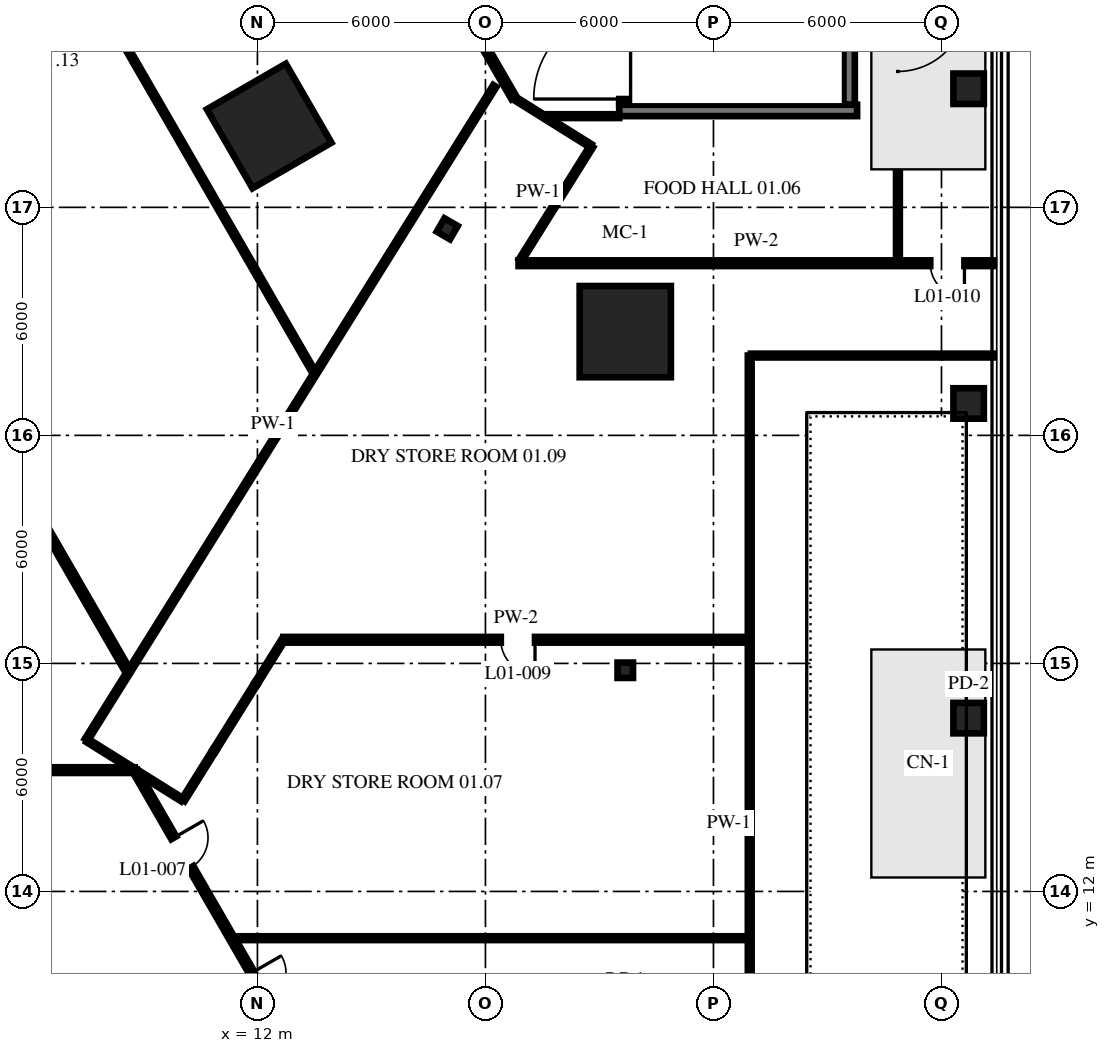
"""IFC4 building model, lengths in metres.
Left out: names, types, materials, properties, quantities, classifications, styles, units other than length and angle.
Written with IfcOpenShell. Run it as: python <this file> out.ifc"""

import sys

from ifc_helpers import new_model, si_unit, direction, frame, frame_2d, origin, origin_2d, place, context, subcontext, project, spatial, polyline, rectangle, i_section, outline, extrude, source, transform, mapped, element, fill, save


model = new_model("IFC4")
c1 = context("Model", 3, precision=1e-05, world=origin(), true_north=direction((0.0, 1.0)))
c2 = subcontext(c1, "Body", "Model", "MODEL_VIEW")
j1 = project(units=[si_unit("LENGTHUNIT", "METRE"), si_unit("PLANEANGLEUNIT", "RADIAN")], contexts=[c1])
p1 = place(None, origin())
s1 = spatial("IfcSite", under=j1, at=p1, CompositionType="ELEMENT")
p2 = place(p1, origin())
s2 = spatial("IfcBuilding", under=s1, at=p2, CompositionType="ELEMENT")
p3 = place(p2, frame((0.0, 0.0, 7.0)))
s3 = spatial("IfcBuildingStorey", under=s2, at=p3, CompositionType="ELEMENT", Elevation=7.0)
m1 = source(origin(), c2, "Body", "SweptSolid", [
    extrude(i_section(OverallWidth=0.404, OverallDepth=0.406, WebThickness=0.027, FlangeThickness=0.044, at=origin_2d()), origin(), (0.0, 0.0, 1.0), 4.5),
])
p4 = place(p3, frame((21.679, 17.82, 0.0), z_axis=(0.0, 0.0, 1.0), x_axis=(0.0, 1.0, 0.0)))
e1 = element("IfcColumn", 1, at=p4, inside=s3, PredefinedType="COLUMN", context=c2, shape_type="MappedRepresentation", body=[
    mapped(m1, transform((0.0, 0.0, 0.0), scale=1.0)),
])
m2 = source(origin(), c2, "Body", "SweptSolid", [
    extrude(rectangle(XDim=2.4, YDim=2.4, at=origin_2d()), origin(), (0.0, 0.0, 1.0), 4.5),
])
p5 = place(p3, frame((21.679, 26.73, 0.0), z_axis=(0.0, 0.0, 1.0), x_axis=(0.0, 1.0, 0.0)))
e2 = element("IfcColumn", 2, at=p5, inside=s3, PredefinedType="COLUMN", context=c2, shape_type="MappedRepresentation", body=[
    mapped(m2, transform((0.0, 0.0, 0.0), scale=1.0)),
])
p6 = place(p3, frame((16.994, 29.435, 0.0), z_axis=(0.0, 0.0, 1.0), x_axis=(-0.866026276448, 0.4999984885, 0.0)))
e3 = element("IfcColumn", 3, at=p6, inside=s3, PredefinedType="COLUMN", context=c2, shape_type="MappedRepresentation", body=[
    mapped(m1, transform((0.0, 0.0, 0.0), scale=1.0)),
])
p7 = place(p3, frame((12.309, 32.14, 0.0), z_axis=(0.0, 0.0, 1.0), x_axis=(-0.866025403784, -0.5, 0.0)))
e4 = element("IfcColumn", 4, at=p7, inside=s3, PredefinedType="COLUMN", context=c2, shape_type="MappedRepresentation", body=[
    mapped(m2, transform((0.0, 0.0, 0.0), scale=1.0)),
])
m3 = source(origin(), c2, "Body", "SweptSolid", [
    extrude(rectangle(XDim=0.8, YDim=0.8, at=origin_2d()), origin(), (0.0, 0.0, 1.0), 4.5),
])
for number, where, z_axis, x_axis in (
    (5, (30.715, 16.56, 0.0), (0.0, 0.0, 1.0), (0.0, 1.0, 0.0)),
    (6, (30.715, 24.84, 0.0), (0.0, 0.0, 1.0), (0.0, 1.0, 0.0)),
    (7, (30.715, 33.12, 0.0), (0.0, 0.0, 1.0), (0.0, 1.0, 0.0)),
):
    element("IfcColumn", number, at=place(p3, frame(where, z_axis=z_axis, x_axis=x_axis)), inside=s3, PredefinedType="COLUMN", context=c2, shape_type="MappedRepresentation", body=[
        mapped(m3, transform((0.0, 0.0, 0.0), scale=1.0)),
    ])
m4 = source(origin(), c2, "Body", "SweptSolid", [
    extrude(outline(polyline([(-0.115, -0.2), (11.885, -0.2), (11.654, 0.2), (0.115, 0.2), (-0.115, -0.2)])), origin(), (0.0, 0.0, 1.0), 4.3),
])
p8 = place(p3, frame((11.769, 0.0, 0.0), z_axis=(0.0, 0.0, 1.0), x_axis=(-0.499996592174, 0.866027371285, 0.0)))
e8 = element("IfcWall", 8, at=p8, inside=s3, PredefinedType="SHEAR", context=c2, shape_type="MappedRepresentation", body=[
    mapped(m4, transform((0.0, 0.0, 0.0), scale=1.0)),
])
p9 = place(p8, frame((5.75, 0.0, 0.0)))
e9 = element("IfcOpeningElement", 9, at=p9, cuts=e8, PredefinedType="OPENING", context=c2, shape_type="SweptSolid", body=[
    extrude(rectangle(XDim=1.2, YDim=2.1, at=frame_2d((0.6, 1.05))), frame((0.0, 0.21, 0.0), z_axis=(0.0, -1.0, 0.0), x_axis=(1.0, 0.0, 0.0)), (0.0, 0.0, 1.0), 0.42),
])
m5 = source(origin(), c2, "Body", "SweptSolid", [
    extrude(rectangle(XDim=10.3, YDim=0.3, at=frame_2d((5.15, 0.0))), origin(), (0.0, 0.0, 1.0), 4.3),
])
p10 = place(p3, frame((21.67, 32.7, 0.0), z_axis=(0.0, 0.0, 1.0), x_axis=(0.0, 1.0, 0.0)))
e10 = element("IfcWall", 10, at=p10, inside=s3, PredefinedType="SHEAR", context=c2, shape_type="MappedRepresentation", body=[
    mapped(m5, transform((0.0, 0.0, 0.0), scale=1.0)),
])
p11 = place(p10, frame((0.15, 0.0, 0.0)))
e11 = element("IfcOpeningElement", 11, at=p11, cuts=e10, PredefinedType="OPENING", context=c2, shape_type="SweptSolid", body=[
    extrude(rectangle(XDim=2.4, YDim=2.1, at=frame_2d((1.2, 1.05))), frame((0.0, 0.16, 0.0), z_axis=(0.0, -1.0, 0.0), x_axis=(1.0, 0.0, 0.0)), (0.0, 0.0, 1.0), 0.32),
])
p12 = place(p3, frame((27.57, 32.7, 0.0), z_axis=(0.0, 0.0, 1.0), x_axis=(0.0, 1.0, 0.0)))
e12 = element("IfcWall", 12, at=p12, inside=s3, PredefinedType="SHEAR", context=c2, shape_type="MappedRepresentation", body=[
    mapped(m5, transform((0.0, 0.0, 0.0), scale=1.0)),
])
m6 = source(origin(), c2, "Body", "SweptSolid", [
    extrude(rectangle(XDim=6.26, YDim=0.3, at=frame_2d((3.13, 0.0))), origin(), (0.0, 0.0, 1.0), 4.3),
])
p13 = place(p3, frame((21.52, 32.55, 0.0), z_axis=(0.0, 0.0, 1.0), x_axis=(1.0, 0.0, 0.0)))
e13 = element("IfcWall", 13, at=p13, inside=s3, PredefinedType="SHEAR", context=c2, shape_type="MappedRepresentation", body=[
    mapped(m6, transform((0.0, 0.0, 0.0), scale=1.0)),
])
p14 = place(p3, frame((8.792, 15.156, 0.0), z_axis=(0.0, 0.0, 1.0), x_axis=(0.499996830835, -0.866027233495, 0.0)))
e14 = element("IfcWall", 14, at=p14, inside=s3, PredefinedType="PARTITIONING", context=c2, shape_type="SweptSolid", body=[
    extrude(rectangle(XDim=17.458, YDim=0.15, at=frame_2d((8.729, 0.0))), origin(), (0.0, 0.0, 1.0), 4.3),
])
p15 = place(p14, frame((11.551, 0.0, 0.0)))
e15 = element("IfcOpeningElement", 15, at=p15, cuts=e14, PredefinedType="OPENING", context=c2, shape_type="SweptSolid", body=[
    extrude(rectangle(XDim=2.4, YDim=2.4, at=frame_2d((1.2, 1.2))), frame((0.0, 0.085, 0.0), z_axis=(0.0, -1.0, 0.0), x_axis=(1.0, 0.0, 0.0)), (0.0, 0.0, 1.0), 0.17),
])
p16 = place(p14, frame((2.014, 0.0, 0.0)))
e16 = element("IfcOpeningElement", 16, at=p16, cuts=e14, PredefinedType="OPENING", context=c2, shape_type="SweptSolid", body=[
    extrude(rectangle(XDim=0.9, YDim=2.1, at=frame_2d((0.45, 1.05))), frame((0.0, 0.085, 0.0), z_axis=(0.0, -1.0, 0.0), x_axis=(1.0, 0.0, 0.0)), (0.0, 0.0, 1.0), 0.17),
])
p17 = place(p14, frame((6.117, 0.0, 0.0)))
e17 = element("IfcOpeningElement", 17, at=p17, cuts=e14, PredefinedType="OPENING", context=c2, shape_type="SweptSolid", body=[
    extrude(rectangle(XDim=0.9, YDim=2.1, at=frame_2d((0.45, 1.05))), frame((0.0, 0.085, 0.0), z_axis=(0.0, -1.0, 0.0), x_axis=(1.0, 0.0, 0.0)), (0.0, 0.0, 1.0), 0.17),
])
p18 = place(p3, frame((-1.012, 34.432, 0.0), z_axis=(0.0, 0.0, 1.0), x_axis=(0.500001446062, -0.866024568899, 0.0)))
e18 = element("IfcWall", 18, at=p18, inside=s3, PredefinedType="PARTITIONING", context=c2, shape_type="SweptSolid", body=[
    extrude(rectangle(XDim=19.165, YDim=0.15, at=frame_2d((9.582, 0.0))), origin(), (0.0, 0.0, 1.0), 4.3),
])
p19 = place(p18, frame((9.094, 0.0, 0.0)))
e19 = element("IfcOpeningElement", 19, at=p19, cuts=e18, PredefinedType="OPENING", context=c2, shape_type="SweptSolid", body=[
    extrude(rectangle(XDim=0.9, YDim=2.1, at=frame_2d((0.45, 1.05))), frame((0.0, 0.085, 0.0), z_axis=(0.0, -1.0, 0.0), x_axis=(1.0, 0.0, 0.0)), (0.0, 0.0, 1.0), 0.17),
])
p20 = place(p3, frame((6.064, 38.517, 0.0), z_axis=(0.0, 0.0, 1.0), x_axis=(0.499994955836, -0.866028316015, 0.0)))
e20 = element("IfcWall", 20, at=p20, inside=s3, PredefinedType="PARTITIONING", context=c2, shape_type="SweptSolid", body=[
    extrude(rectangle(XDim=14.839, YDim=0.1, at=frame_2d((7.419, 0.0))), origin(), (0.0, 0.0, 1.0), 4.3),
])
p21 = place(p3, frame((12.612, 43.515, 0.0), z_axis=(0.0, 0.0, 1.0), x_axis=(0.50000466477, -0.866022710561, 0.0)))
e21 = element("IfcWall", 21, at=p21, inside=s3, PredefinedType="PARTITIONING", context=c2, shape_type="SweptSolid", body=[
    extrude(rectangle(XDim=12.281, YDim=0.15, at=frame_2d((6.141, 0.0))), origin(), (0.0, 0.0, 1.0), 4.3),
])
p22 = place(p21, frame((5.675, 0.0, 0.0)))
e22 = element("IfcOpeningElement", 22, at=p22, cuts=e21, PredefinedType="OPENING", context=c2, shape_type="SweptSolid", body=[
    extrude(rectangle(XDim=0.9, YDim=2.1, at=frame_2d((0.45, 1.05))), frame((0.0, 0.085, 0.0), z_axis=(0.0, -1.0, 0.0), x_axis=(1.0, 0.0, 0.0)), (0.0, 0.0, 1.0), 0.17),
])
p23 = place(p3, frame((7.524, 15.971, 0.0), z_axis=(0.0, 0.0, 1.0), x_axis=(0.848138224162, -0.529775001973, 0.0)))
e23 = element("IfcWall", 23, at=p23, inside=s3, PredefinedType="PARTITIONING", context=c2, shape_type="SweptSolid", body=[
    extrude(rectangle(XDim=2.94, YDim=0.1, at=frame_2d((1.47, 0.0))), origin(), (0.0, 0.0, 1.0), 4.3),
])
p24 = place(p3, frame((18.757, 32.877, 0.0), z_axis=(0.0, 0.0, 1.0), x_axis=(0.848102444988, -0.529832277996, 0.0)))
e24 = element("IfcWall", 24, at=p24, inside=s3, PredefinedType="PARTITIONING", context=c2, shape_type="SweptSolid", body=[
    extrude(rectangle(XDim=2.37, YDim=0.1, at=frame_2d((1.185, 0.0))), origin(), (0.0, 0.0, 1.0), 4.3),
])
p25 = place(p3, frame((11.415, 10.77, 0.0), z_axis=(0.0, 0.0, 1.0), x_axis=(1.0, 0.0, 0.0)))
e25 = element("IfcWall", 25, at=p25, inside=s3, PredefinedType="PARTITIONING", context=c2, shape_type="SweptSolid", body=[
    extrude(rectangle(XDim=13.51, YDim=0.1, at=frame_2d((6.755, 0.0))), origin(), (0.0, 0.0, 1.0), 4.3),
])
p26 = place(p3, frame((-8.771, 15.192, 0.0), z_axis=(0.0, 0.0, 1.0), x_axis=(1.0, 0.0, 0.0)))
e26 = element("IfcWall", 26, at=p26, inside=s3, PredefinedType="PARTITIONING", context=c2, shape_type="SweptSolid", body=[
    extrude(rectangle(XDim=17.541, YDim=0.15, at=frame_2d((8.771, 0.0))), origin(), (0.0, 0.0, 1.0), 4.3),
])
p27 = place(p26, frame((4.212, 0.0, 0.0)))
e27 = element("IfcOpeningElement", 27, at=p27, cuts=e26, PredefinedType="OPENING", context=c2, shape_type="SweptSolid", body=[
    extrude(rectangle(XDim=0.9, YDim=2.1, at=frame_2d((0.45, 1.05))), frame((0.0, 0.085, 0.0), z_axis=(0.0, -1.0, 0.0), x_axis=(1.0, 0.0, 0.0)), (0.0, 0.0, 1.0), 0.17),
])
p28 = place(p26, frame((12.993, 0.0, 0.0)))
e28 = element("IfcOpeningElement", 28, at=p28, cuts=e26, PredefinedType="OPENING", context=c2, shape_type="SweptSolid", body=[
    extrude(rectangle(XDim=0.9, YDim=2.1, at=frame_2d((0.45, 1.05))), frame((0.0, 0.085, 0.0), z_axis=(0.0, -1.0, 0.0), x_axis=(1.0, 0.0, 0.0)), (0.0, 0.0, 1.0), 0.17),
])
p29 = place(p3, frame((12.682, 18.622, 0.0), z_axis=(0.0, 0.0, 1.0), x_axis=(1.0, 0.0, 0.0)))
e29 = element("IfcWall", 29, at=p29, inside=s3, PredefinedType="PARTITIONING", context=c2, shape_type="SweptSolid", body=[
    extrude(rectangle(XDim=12.242, YDim=0.15, at=frame_2d((6.121, 0.0))), origin(), (0.0, 0.0, 1.0), 4.3),
])
p30 = place(p29, frame((5.722, 0.0, 0.0)))
e30 = element("IfcOpeningElement", 30, at=p30, cuts=e29, PredefinedType="OPENING", context=c2, shape_type="SweptSolid", body=[
    extrude(rectangle(XDim=0.9, YDim=2.1, at=frame_2d((0.45, 1.05))), frame((0.0, 0.085, 0.0), z_axis=(0.0, -1.0, 0.0), x_axis=(1.0, 0.0, 0.0)), (0.0, 0.0, 1.0), 0.17),
])
m7 = source(origin(), c2, "Body", "SweptSolid", [
    extrude(rectangle(XDim=6.395, YDim=0.1, at=frame_2d((3.198, 0.0))), origin(), (0.0, 0.0, 1.0), 4.3),
])
p31 = place(p3, frame((24.984, 26.1, 0.0), z_axis=(0.0, 0.0, 1.0), x_axis=(1.0, 0.0, 0.0)))
e31 = element("IfcWall", 31, at=p31, inside=s3, PredefinedType="PARTITIONING", context=c2, shape_type="MappedRepresentation", body=[
    mapped(m7, transform((0.0, 0.0, 0.0), scale=1.0)),
])
p32 = place(p3, frame((18.871, 28.53, 0.0), z_axis=(0.0, 0.0, 1.0), x_axis=(1.0, 0.0, 0.0)))
e32 = element("IfcWall", 32, at=p32, inside=s3, PredefinedType="PARTITIONING", context=c2, shape_type="SweptSolid", body=[
    extrude(rectangle(XDim=12.508, YDim=0.15, at=frame_2d((6.254, 0.0))), origin(), (0.0, 0.0, 1.0), 4.3),
])
p33 = place(p32, frame((10.833, 0.0, 0.0)))
e33 = element("IfcOpeningElement", 33, at=p33, cuts=e32, PredefinedType="OPENING", context=c2, shape_type="SweptSolid", body=[
    extrude(rectangle(XDim=0.9, YDim=2.1, at=frame_2d((0.45, 1.05))), frame((0.0, 0.085, 0.0), z_axis=(0.0, -1.0, 0.0), x_axis=(1.0, 0.0, 0.0)), (0.0, 0.0, 1.0), 0.17),
])
m8 = source(origin(), c2, "Body", "SweptSolid", [
    extrude(rectangle(XDim=1.87, YDim=0.1, at=frame_2d((0.935, 0.0))), origin(), (0.0, 0.0, 1.0), 4.3),
])
p34 = place(p3, frame((19.65, 32.4, 0.0), z_axis=(0.0, 0.0, 1.0), x_axis=(1.0, 0.0, 0.0)))
e34 = element("IfcWall", 34, at=p34, inside=s3, PredefinedType="PARTITIONING", context=c2, shape_type="MappedRepresentation", body=[
    mapped(m8, transform((0.0, 0.0, 0.0), scale=1.0)),
])
p35 = place(p3, frame((10.043, 14.398, 0.0), z_axis=(0.0, 0.0, 1.0), x_axis=(0.529829394742, 0.848104246226, 0.0)))
e35 = element("IfcWall", 35, at=p35, inside=s3, PredefinedType="PARTITIONING", context=c2, shape_type="SweptSolid", body=[
    extrude(rectangle(XDim=1.553, YDim=0.1, at=frame_2d((0.777, 0.0))), origin(), (0.0, 0.0, 1.0), 4.3),
])
p36 = place(p3, frame((10.866, 15.715, 0.0), z_axis=(0.0, 0.0, 1.0), x_axis=(0.529713918313, 0.848176375965, 0.0)))
e36 = element("IfcWall", 36, at=p36, inside=s3, PredefinedType="PARTITIONING", context=c2, shape_type="SweptSolid", body=[
    extrude(rectangle(XDim=2.079, YDim=0.1, at=frame_2d((1.04, 0.0))), origin(), (0.0, 0.0, 1.0), 3.358),
])
p37 = place(p3, frame((11.968, 17.479, 0.0), z_axis=(0.0, 0.0, 1.0), x_axis=(0.529780863385, 0.848134562903, 0.0)))
e37 = element("IfcWall", 37, at=p37, inside=s3, PredefinedType="PARTITIONING", context=c2, shape_type="SweptSolid", body=[
    extrude(rectangle(XDim=1.308, YDim=0.1, at=frame_2d((0.654, 0.0))), origin(), (0.0, 0.0, 1.0), 4.3),
])
p38 = place(p3, frame((18.924, 28.615, 0.0), z_axis=(0.0, 0.0, 1.0), x_axis=(0.52976863329, 0.848142202217, 0.0)))
e38 = element("IfcWall", 38, at=p38, inside=s3, PredefinedType="PARTITIONING", context=c2, shape_type="SweptSolid", body=[
    extrude(rectangle(XDim=3.526, YDim=0.1, at=frame_2d((1.763, 0.0))), origin(), (0.0, 0.0, 1.0), 4.3),
])
p39 = place(p3, frame((7.499, 15.987, 0.0), z_axis=(0.0, 0.0, 1.0), x_axis=(0.529789085059, 0.848129427241, 0.0)))
e39 = element("IfcWall", 39, at=p39, inside=s3, PredefinedType="PARTITIONING", context=c2, shape_type="SweptSolid", body=[
    extrude(rectangle(XDim=20.289, YDim=0.1, at=frame_2d((10.145, 0.0))), origin(), (0.0, 0.0, 1.0), 4.3),
])
p40 = place(p3, frame((28.854, 28.59, 0.0), z_axis=(0.0, 0.0, 1.0), x_axis=(0.0, 1.0, 0.0)))
e40 = element("IfcWall", 40, at=p40, inside=s3, PredefinedType="PARTITIONING", context=c2, shape_type="SweptSolid", body=[
    extrude(rectangle(XDim=11.736, YDim=0.1, at=frame_2d((5.868, 0.0))), origin(), (0.0, 0.0, 1.0), 4.3),
])
p41 = place(p40, frame((4.986, 0.0, 0.0)))
e41 = element("IfcOpeningElement", 41, at=p41, cuts=e40, PredefinedType="OPENING", context=c2, shape_type="SweptSolid", body=[
    extrude(rectangle(XDim=1.8, YDim=2.4, at=frame_2d((0.9, 1.2))), frame((0.0, 0.06, 0.0), z_axis=(0.0, -1.0, 0.0), x_axis=(1.0, 0.0, 0.0)), (0.0, 0.0, 1.0), 0.12),
])
p42 = place(p3, frame((24.954, 1.5, 0.0), z_axis=(0.0, 0.0, 1.0), x_axis=(0.0, 1.0, 0.0)))
e42 = element("IfcWall", 42, at=p42, inside=s3, PredefinedType="PARTITIONING", context=c2, shape_type="SweptSolid", body=[
    extrude(rectangle(XDim=24.6, YDim=0.1, at=frame_2d((12.3, 0.0))), origin(), (0.0, 0.0, 1.0), 4.3),
])
p43 = place(p11, origin())
e43 = element("IfcDoor", 43, at=p43, inside=s3, OperationType="DOUBLE_DOOR_DOUBLE_SWING", PredefinedType="DOOR", context=c2, shape_type="SweptSolid", body=[
    extrude(rectangle(XDim=2.4, YDim=2.1, at=frame_2d((1.2, 1.05))), frame((0.0, 0.025, 0.0), z_axis=(0.0, -1.0, 0.0), x_axis=(1.0, 0.0, 0.0)), (0.0, 0.0, 1.0), 0.05),
])
fill(e11, e43)
p44 = place(p41, origin())
e44 = element("IfcDoor", 44, at=p44, inside=s3, OperationType="DOUBLE_DOOR_SINGLE_SWING", PredefinedType="DOOR", context=c2, shape_type="SweptSolid", body=[
    extrude(rectangle(XDim=1.8, YDim=2.4, at=frame_2d((0.9, 1.2))), frame((0.0, 0.025, 0.0), z_axis=(0.0, -1.0, 0.0), x_axis=(1.0, 0.0, 0.0)), (0.0, 0.0, 1.0), 0.05),
])
fill(e41, e44)
p45 = place(p16, origin())
e45 = element("IfcDoor", 45, at=p45, inside=s3, OperationType="SINGLE_SWING_LEFT", PredefinedType="DOOR", context=c2, shape_type="SweptSolid", body=[
    extrude(rectangle(XDim=0.9, YDim=2.1, at=frame_2d((0.45, 1.05))), frame((0.0, 0.025, 0.0), z_axis=(0.0, -1.0, 0.0), x_axis=(1.0, 0.0, 0.0)), (0.0, 0.0, 1.0), 0.05),
])
fill(e16, e45)
p46 = place(p17, origin())
e46 = element("IfcDoor", 46, at=p46, inside=s3, OperationType="SINGLE_SWING_LEFT", PredefinedType="DOOR", context=c2, shape_type="SweptSolid", body=[
    extrude(rectangle(XDim=0.9, YDim=2.1, at=frame_2d((0.45, 1.05))), frame((0.0, 0.025, 0.0), z_axis=(0.0, -1.0, 0.0), x_axis=(1.0, 0.0, 0.0)), (0.0, 0.0, 1.0), 0.05),
])
fill(e17, e46)
p47 = place(p30, origin())
e47 = element("IfcDoor", 47, at=p47, inside=s3, OperationType="SINGLE_SWING_RIGHT", PredefinedType="DOOR", context=c2, shape_type="SweptSolid", body=[
    extrude(rectangle(XDim=0.9, YDim=2.1, at=frame_2d((0.45, 1.05))), frame((0.0, 0.025, 0.0), z_axis=(0.0, -1.0, 0.0), x_axis=(1.0, 0.0, 0.0)), (0.0, 0.0, 1.0), 0.05),
])
fill(e30, e47)
p48 = place(p33, origin())
e48 = element("IfcDoor", 48, at=p48, inside=s3, OperationType="SINGLE_SWING_RIGHT", PredefinedType="DOOR", context=c2, shape_type="SweptSolid", body=[
    extrude(rectangle(XDim=0.9, YDim=2.1, at=frame_2d((0.45, 1.05))), frame((0.0, 0.025, 0.0), z_axis=(0.0, -1.0, 0.0), x_axis=(1.0, 0.0, 0.0)), (0.0, 0.0, 1.0), 0.05),
])
fill(e33, e48)
save(model, sys.argv[1])
